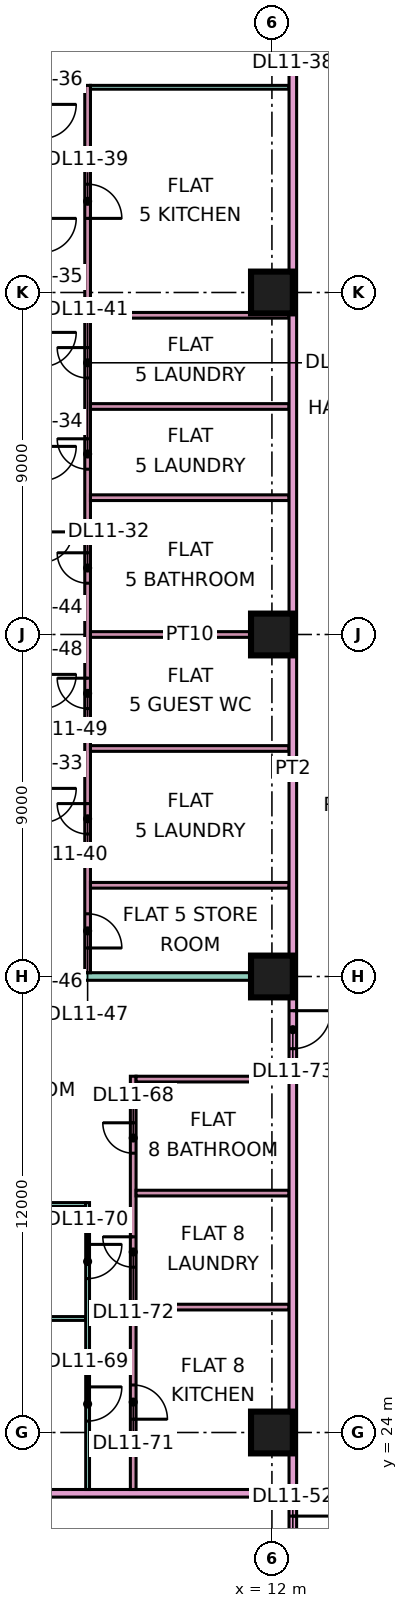
"""IFC4 building model, lengths in metres.
Left out: names, types, materials, properties, quantities, classifications, styles, units other than length and angle.
Written with IfcOpenShell. Run it as: python <this file> out.ifc"""

import sys

from ifc_helpers import new_model, si_unit, direction, frame, frame_2d, origin, origin_2d, place, context, subcontext, project, spatial, rectangle, extrude, element, fill, save


model = new_model("IFC4")
c1 = context("Model", 3, precision=1e-05, world=origin(), true_north=direction((0.0, 1.0)))
c2 = subcontext(c1, "Body", "Model", "MODEL_VIEW")
j1 = project(units=[si_unit("LENGTHUNIT", "METRE"), si_unit("PLANEANGLEUNIT", "RADIAN")], contexts=[c1])
p1 = place(None, origin())
s1 = spatial("IfcSite", under=j1, at=p1, CompositionType="ELEMENT")
p2 = place(p1, origin())
s2 = spatial("IfcBuilding", under=s1, at=p2, CompositionType="ELEMENT")
p3 = place(p2, frame((0.0, 0.0, 56.4)))
s3 = spatial("IfcBuildingStorey", under=s2, at=p3, CompositionType="ELEMENT", Elevation=56.4)
for number, where, z_axis, x_axis in (
    (1, (12.0, 24.0, 0.0), (0.0, 0.0, 1.0), (1.0, 0.0, 0.0)),
    (2, (12.0, 36.0, 0.0), (0.0, 0.0, 1.0), (1.0, 0.0, 0.0)),
    (3, (12.0, 45.0, 0.0), (0.0, 0.0, 1.0), (1.0, 0.0, 0.0)),
    (4, (12.0, 54.0, 0.0), (0.0, 0.0, 1.0), (1.0, 0.0, 0.0)),
):
    element("IfcColumn", number, at=place(p3, frame(where, z_axis=z_axis, x_axis=x_axis)), inside=s3, PredefinedType="COLUMN", context=c2, shape_type="SweptSolid", body=[
        extrude(rectangle(XDim=1.1, YDim=1.1, at=origin_2d()), origin(), (0.0, 0.0, 1.0), 3.75),
    ])
p4 = place(p3, frame((-1.351, 27.0, 0.0), z_axis=(0.0, 0.0, 1.0), x_axis=(1.0, 0.0, 0.0)))
e5 = element("IfcWall", 5, at=p4, inside=s3, PredefinedType="PARTITIONING", context=c2, shape_type="SweptSolid", body=[
    extrude(rectangle(XDim=8.451, YDim=0.1, at=frame_2d((4.226, 0.0))), origin(), (0.0, 0.0, 1.0), 3.35),
])
p5 = place(p3, frame((-1.35, 30.0, 0.0), z_axis=(0.0, 0.0, 1.0), x_axis=(1.0, 0.0, 0.0)))
e6 = element("IfcWall", 6, at=p5, inside=s3, PredefinedType="PARTITIONING", context=c2, shape_type="SweptSolid", body=[
    extrude(rectangle(XDim=8.45, YDim=0.1, at=frame_2d((4.225, 0.0))), origin(), (0.0, 0.0, 1.0), 3.35),
])
p6 = place(p3, frame((0.0, 36.0, 0.0), z_axis=(0.0, 0.0, 1.0), x_axis=(1.0, 0.0, 0.0)))
e7 = element("IfcWall", 7, at=p6, inside=s3, PredefinedType="PARTITIONING", context=c2, shape_type="SweptSolid", body=[
    extrude(rectangle(XDim=12.45, YDim=0.2, at=frame_2d((6.225, 0.0))), origin(), (0.0, 0.0, 1.0), 3.35),
])
p7 = place(p3, frame((0.074, 22.4, 0.0), z_axis=(0.0, 0.0, 1.0), x_axis=(1.0, 0.0, 0.0)))
e8 = element("IfcWall", 8, at=p7, inside=s3, PredefinedType="PARTITIONING", context=c2, shape_type="SweptSolid", body=[
    extrude(rectangle(XDim=12.376, YDim=0.2, at=frame_2d((6.188, 0.0))), origin(), (0.0, 0.0, 1.0), 3.35),
])
p8 = place(p3, frame((7.15, 22.5, 0.0), z_axis=(0.0, 0.0, 1.0), x_axis=(0.0, 1.0, 0.0)))
e9 = element("IfcWall", 9, at=p8, inside=s3, PredefinedType="PARTITIONING", context=c2, shape_type="SweptSolid", body=[
    extrude(rectangle(XDim=7.55, YDim=0.1, at=frame_2d((3.775, 0.0))), origin(), (0.0, 0.0, 1.0), 3.35),
])
p9 = place(p8, frame((1.8, 0.0, 0.0)))
e10 = element("IfcOpeningElement", 10, at=p9, cuts=e9, PredefinedType="OPENING", context=c2, shape_type="SweptSolid", body=[
    extrude(rectangle(XDim=0.9, YDim=2.1, at=frame_2d((0.45, 1.05))), frame((0.0, 0.06, 0.0), z_axis=(0.0, -1.0, 0.0), x_axis=(1.0, 0.0, 0.0)), (0.0, 0.0, 1.0), 0.12),
])
p10 = place(p8, frame((5.55, 0.0, 0.0)))
e11 = element("IfcOpeningElement", 11, at=p10, cuts=e9, PredefinedType="OPENING", context=c2, shape_type="SweptSolid", body=[
    extrude(rectangle(XDim=0.9, YDim=2.1, at=frame_2d((0.45, 1.05))), frame((0.0, 0.06, 0.0), z_axis=(0.0, -1.0, 0.0), x_axis=(1.0, 0.0, 0.0)), (0.0, 0.0, 1.0), 0.12),
])
p11 = place(p3, frame((7.15, 36.1, 0.0), z_axis=(0.0, 0.0, 1.0), x_axis=(0.0, 1.0, 0.0)))
e12 = element("IfcWall", 12, at=p11, inside=s3, PredefinedType="PARTITIONING", context=c2, shape_type="SweptSolid", body=[
    extrude(rectangle(XDim=23.35, YDim=0.15, at=frame_2d((11.675, 0.0))), origin(), (0.0, 0.0, 1.0), 3.35),
])
p12 = place(p11, frame((10.25, 0.0, 0.0)))
e13 = element("IfcOpeningElement", 13, at=p12, cuts=e12, PredefinedType="OPENING", context=c2, shape_type="SweptSolid", body=[
    extrude(rectangle(XDim=0.8, YDim=2.1, at=frame_2d((0.4, 1.05))), frame((0.0, 0.085, 0.0), z_axis=(0.0, -1.0, 0.0), x_axis=(1.0, 0.0, 0.0)), (0.0, 0.0, 1.0), 0.17),
])
p13 = place(p11, frame((19.85, 0.0, 0.0)))
e14 = element("IfcOpeningElement", 14, at=p13, cuts=e12, PredefinedType="OPENING", context=c2, shape_type="SweptSolid", body=[
    extrude(rectangle(XDim=0.9, YDim=2.1, at=frame_2d((0.45, 1.05))), frame((0.0, 0.085, 0.0), z_axis=(0.0, -1.0, 0.0), x_axis=(1.0, 0.0, 0.0)), (0.0, 0.0, 1.0), 0.17),
])
p14 = place(p11, frame((3.65, 0.0, 0.0)))
e15 = element("IfcOpeningElement", 15, at=p14, cuts=e12, PredefinedType="OPENING", context=c2, shape_type="SweptSolid", body=[
    extrude(rectangle(XDim=0.8, YDim=2.1, at=frame_2d((0.4, 1.05))), frame((0.0, 0.085, 0.0), z_axis=(0.0, -1.0, 0.0), x_axis=(1.0, 0.0, 0.0)), (0.0, 0.0, 1.0), 0.17),
])
p15 = place(p11, frame((13.25, 0.0, 0.0)))
e16 = element("IfcOpeningElement", 16, at=p15, cuts=e12, PredefinedType="OPENING", context=c2, shape_type="SweptSolid", body=[
    extrude(rectangle(XDim=0.8, YDim=2.1, at=frame_2d((0.4, 1.05))), frame((0.0, 0.085, 0.0), z_axis=(0.0, -1.0, 0.0), x_axis=(1.0, 0.0, 0.0)), (0.0, 0.0, 1.0), 0.17),
])
p16 = place(p11, frame((15.65, 0.0, 0.0)))
e17 = element("IfcOpeningElement", 17, at=p16, cuts=e12, PredefinedType="OPENING", context=c2, shape_type="SweptSolid", body=[
    extrude(rectangle(XDim=0.8, YDim=2.1, at=frame_2d((0.4, 1.05))), frame((0.0, 0.085, 0.0), z_axis=(0.0, -1.0, 0.0), x_axis=(1.0, 0.0, 0.0)), (0.0, 0.0, 1.0), 0.17),
])
p17 = place(p11, frame((0.65, 0.0, 0.0)))
e18 = element("IfcOpeningElement", 18, at=p17, cuts=e12, PredefinedType="OPENING", context=c2, shape_type="SweptSolid", body=[
    extrude(rectangle(XDim=0.9, YDim=2.1, at=frame_2d((0.45, 1.05))), frame((0.0, 0.085, 0.0), z_axis=(0.0, -1.0, 0.0), x_axis=(1.0, 0.0, 0.0)), (0.0, 0.0, 1.0), 0.17),
])
p18 = place(p11, frame((6.95, 0.0, 0.0)))
e19 = element("IfcOpeningElement", 19, at=p18, cuts=e12, PredefinedType="OPENING", context=c2, shape_type="SweptSolid", body=[
    extrude(rectangle(XDim=0.8, YDim=2.1, at=frame_2d((0.4, 1.05))), frame((0.0, 0.085, 0.0), z_axis=(0.0, -1.0, 0.0), x_axis=(1.0, 0.0, 0.0)), (0.0, 0.0, 1.0), 0.17),
])
for number, where, z_axis, x_axis in (
    (20, (7.225, 38.4, 0.0), (0.0, 0.0, 1.0), (1.0, 0.0, 0.0)),
    (21, (7.225, 42.0, 0.0), (0.0, 0.0, 1.0), (1.0, 0.0, 0.0)),
    (22, (7.225, 45.0, 0.0), (0.0, 0.0, 1.0), (1.0, 0.0, 0.0)),
    (23, (7.225, 48.6, 0.0), (0.0, 0.0, 1.0), (1.0, 0.0, 0.0)),
    (24, (7.225, 51.0, 0.0), (0.0, 0.0, 1.0), (1.0, 0.0, 0.0)),
    (25, (7.225, 53.4, 0.0), (0.0, 0.0, 1.0), (1.0, 0.0, 0.0)),
):
    element("IfcWall", number, at=place(p3, frame(where, z_axis=z_axis, x_axis=x_axis)), inside=s3, PredefinedType="PARTITIONING", context=c2, shape_type="SweptSolid", body=[
        extrude(rectangle(XDim=5.225, YDim=0.15, at=frame_2d((2.612, 0.0))), origin(), (0.0, 0.0, 1.0), 3.35),
    ])
p19 = place(p3, frame((7.225, 59.4, 0.0), z_axis=(0.0, 0.0, 1.0), x_axis=(1.0, 0.0, 0.0)))
e26 = element("IfcWall", 26, at=p19, inside=s3, PredefinedType="PARTITIONING", context=c2, shape_type="SweptSolid", body=[
    extrude(rectangle(XDim=5.225, YDim=0.1, at=frame_2d((2.612, 0.0))), origin(), (0.0, 0.0, 1.0), 3.35),
])
p20 = place(p3, frame((8.35, 22.5, 0.0), z_axis=(0.0, 0.0, 1.0), x_axis=(0.0, 1.0, 0.0)))
e27 = element("IfcWall", 27, at=p20, inside=s3, PredefinedType="PARTITIONING", context=c2, shape_type="SweptSolid", body=[
    extrude(rectangle(XDim=10.875, YDim=0.15, at=frame_2d((5.438, 0.0))), origin(), (0.0, 0.0, 1.0), 3.35),
])
p21 = place(p20, frame((8.85, 0.0, 0.0)))
e28 = element("IfcOpeningElement", 28, at=p21, cuts=e27, PredefinedType="OPENING", context=c2, shape_type="SweptSolid", body=[
    extrude(rectangle(XDim=0.8, YDim=2.1, at=frame_2d((0.4, 1.05))), frame((0.0, 0.085, 0.0), z_axis=(0.0, -1.0, 0.0), x_axis=(1.0, 0.0, 0.0)), (0.0, 0.0, 1.0), 0.17),
])
p22 = place(p20, frame((1.85, 0.0, 0.0)))
e29 = element("IfcOpeningElement", 29, at=p22, cuts=e27, PredefinedType="OPENING", context=c2, shape_type="SweptSolid", body=[
    extrude(rectangle(XDim=0.9, YDim=2.1, at=frame_2d((0.45, 1.05))), frame((0.0, 0.085, 0.0), z_axis=(0.0, -1.0, 0.0), x_axis=(1.0, 0.0, 0.0)), (0.0, 0.0, 1.0), 0.17),
])
p23 = place(p20, frame((5.85, 0.0, 0.0)))
e30 = element("IfcOpeningElement", 30, at=p23, cuts=e27, PredefinedType="OPENING", context=c2, shape_type="SweptSolid", body=[
    extrude(rectangle(XDim=0.8, YDim=2.1, at=frame_2d((0.4, 1.05))), frame((0.0, 0.085, 0.0), z_axis=(0.0, -1.0, 0.0), x_axis=(1.0, 0.0, 0.0)), (0.0, 0.0, 1.0), 0.17),
])
for number, where, z_axis, x_axis in (
    (31, (8.425, 27.3, 0.0), (0.0, 0.0, 1.0), (1.0, 0.0, 0.0)),
    (32, (8.425, 30.3, 0.0), (0.0, 0.0, 1.0), (1.0, 0.0, 0.0)),
    (33, (8.425, 33.3, 0.0), (0.0, 0.0, 1.0), (1.0, 0.0, 0.0)),
):
    element("IfcWall", number, at=place(p3, frame(where, z_axis=z_axis, x_axis=x_axis)), inside=s3, PredefinedType="PARTITIONING", context=c2, shape_type="SweptSolid", body=[
        extrude(rectangle(XDim=4.025, YDim=0.15, at=frame_2d((2.012, 0.0))), origin(), (0.0, 0.0, 1.0), 3.35),
    ])
p24 = place(p3, frame((12.55, 20.0, 0.0), z_axis=(0.0, 0.0, 1.0), x_axis=(0.0, 1.0, 0.0)))
e34 = element("IfcWall", 34, at=p24, inside=s3, PredefinedType="PARTITIONING", context=c2, shape_type="SweptSolid", body=[
    extrude(rectangle(XDim=42.926, YDim=0.2, at=frame_2d((21.463, 0.0))), origin(), (0.0, 0.0, 1.0), 3.35),
])
p25 = place(p24, frame((40.65, 0.0, 0.0)))
e35 = element("IfcOpeningElement", 35, at=p25, cuts=e34, PredefinedType="OPENING", context=c2, shape_type="SweptSolid", body=[
    extrude(rectangle(XDim=1.0, YDim=2.1, at=frame_2d((0.5, 1.05))), frame((0.0, 0.11, 0.0), z_axis=(0.0, -1.0, 0.0), x_axis=(1.0, 0.0, 0.0)), (0.0, 0.0, 1.0), 0.22),
])
p26 = place(p24, frame((0.6, 0.0, 0.0)))
e36 = element("IfcOpeningElement", 36, at=p26, cuts=e34, PredefinedType="OPENING", context=c2, shape_type="SweptSolid", body=[
    extrude(rectangle(XDim=1.2, YDim=2.1, at=frame_2d((0.6, 1.05))), frame((0.0, 0.11, 0.0), z_axis=(0.0, -1.0, 0.0), x_axis=(1.0, 0.0, 0.0)), (0.0, 0.0, 1.0), 0.22),
])
p27 = place(p24, frame((14.1, 0.0, 0.0)))
e37 = element("IfcOpeningElement", 37, at=p27, cuts=e34, PredefinedType="OPENING", context=c2, shape_type="SweptSolid", body=[
    extrude(rectangle(XDim=1.0, YDim=2.1, at=frame_2d((0.5, 1.05))), frame((0.0, 0.11, 0.0), z_axis=(0.0, -1.0, 0.0), x_axis=(1.0, 0.0, 0.0)), (0.0, 0.0, 1.0), 0.22),
])
p28 = place(p12, frame((0.8, 0.0, 0.0), z_axis=(0.0, 0.0, 1.0), x_axis=(-1.0, 0.0, 0.0)))
e38 = element("IfcDoor", 38, at=p28, inside=s3, OperationType="SINGLE_SWING_RIGHT", PredefinedType="DOOR", context=c2, shape_type="SweptSolid", body=[
    extrude(rectangle(XDim=0.8, YDim=2.1, at=frame_2d((0.4, 1.05))), frame((0.0, 0.025, 0.0), z_axis=(0.0, -1.0, 0.0), x_axis=(1.0, 0.0, 0.0)), (0.0, 0.0, 1.0), 0.05),
])
fill(e13, e38)
p29 = place(p13, frame((0.9, 0.0, 0.0), z_axis=(0.0, 0.0, 1.0), x_axis=(-1.0, 0.0, 0.0)))
e39 = element("IfcDoor", 39, at=p29, inside=s3, OperationType="SINGLE_SWING_LEFT", PredefinedType="DOOR", context=c2, shape_type="SweptSolid", body=[
    extrude(rectangle(XDim=0.9, YDim=2.1, at=frame_2d((0.45, 1.05))), frame((0.0, 0.025, 0.0), z_axis=(0.0, -1.0, 0.0), x_axis=(1.0, 0.0, 0.0)), (0.0, 0.0, 1.0), 0.05),
])
fill(e14, e39)
p30 = place(p14, frame((0.8, 0.0, 0.0), z_axis=(0.0, 0.0, 1.0), x_axis=(-1.0, 0.0, 0.0)))
e40 = element("IfcDoor", 40, at=p30, inside=s3, OperationType="SINGLE_SWING_RIGHT", PredefinedType="DOOR", context=c2, shape_type="SweptSolid", body=[
    extrude(rectangle(XDim=0.8, YDim=2.1, at=frame_2d((0.4, 1.05))), frame((0.0, 0.025, 0.0), z_axis=(0.0, -1.0, 0.0), x_axis=(1.0, 0.0, 0.0)), (0.0, 0.0, 1.0), 0.05),
])
fill(e15, e40)
p31 = place(p15, frame((0.8, 0.0, 0.0), z_axis=(0.0, 0.0, 1.0), x_axis=(-1.0, 0.0, 0.0)))
e41 = element("IfcDoor", 41, at=p31, inside=s3, OperationType="SINGLE_SWING_RIGHT", PredefinedType="DOOR", context=c2, shape_type="SweptSolid", body=[
    extrude(rectangle(XDim=0.8, YDim=2.1, at=frame_2d((0.4, 1.05))), frame((0.0, 0.025, 0.0), z_axis=(0.0, -1.0, 0.0), x_axis=(1.0, 0.0, 0.0)), (0.0, 0.0, 1.0), 0.05),
])
fill(e16, e41)
p32 = place(p16, frame((0.8, 0.0, 0.0), z_axis=(0.0, 0.0, 1.0), x_axis=(-1.0, 0.0, 0.0)))
e42 = element("IfcDoor", 42, at=p32, inside=s3, OperationType="SINGLE_SWING_RIGHT", PredefinedType="DOOR", context=c2, shape_type="SweptSolid", body=[
    extrude(rectangle(XDim=0.8, YDim=2.1, at=frame_2d((0.4, 1.05))), frame((0.0, 0.025, 0.0), z_axis=(0.0, -1.0, 0.0), x_axis=(1.0, 0.0, 0.0)), (0.0, 0.0, 1.0), 0.05),
])
fill(e17, e42)
p33 = place(p17, frame((0.9, 0.0, 0.0), z_axis=(0.0, 0.0, 1.0), x_axis=(-1.0, 0.0, 0.0)))
e43 = element("IfcDoor", 43, at=p33, inside=s3, OperationType="SINGLE_SWING_LEFT", PredefinedType="DOOR", context=c2, shape_type="SweptSolid", body=[
    extrude(rectangle(XDim=0.9, YDim=2.1, at=frame_2d((0.45, 1.05))), frame((0.0, 0.025, 0.0), z_axis=(0.0, -1.0, 0.0), x_axis=(1.0, 0.0, 0.0)), (0.0, 0.0, 1.0), 0.05),
])
fill(e18, e43)
p34 = place(p18, frame((0.8, 0.0, 0.0), z_axis=(0.0, 0.0, 1.0), x_axis=(-1.0, 0.0, 0.0)))
e44 = element("IfcDoor", 44, at=p34, inside=s3, OperationType="SINGLE_SWING_RIGHT", PredefinedType="DOOR", context=c2, shape_type="SweptSolid", body=[
    extrude(rectangle(XDim=0.8, YDim=2.1, at=frame_2d((0.4, 1.05))), frame((0.0, 0.025, 0.0), z_axis=(0.0, -1.0, 0.0), x_axis=(1.0, 0.0, 0.0)), (0.0, 0.0, 1.0), 0.05),
])
fill(e19, e44)
p35 = place(p26, origin())
e45 = element("IfcDoor", 45, at=p35, inside=s3, OperationType="SINGLE_SWING_RIGHT", PredefinedType="DOOR", context=c2, shape_type="SweptSolid", body=[
    extrude(rectangle(XDim=1.2, YDim=2.1, at=frame_2d((0.6, 1.05))), frame((0.0, 0.025, 0.0), z_axis=(0.0, -1.0, 0.0), x_axis=(1.0, 0.0, 0.0)), (0.0, 0.0, 1.0), 0.05),
])
fill(e36, e45)
p36 = place(p21, frame((0.8, 0.0, 0.0), z_axis=(0.0, 0.0, 1.0), x_axis=(-1.0, 0.0, 0.0)))
e46 = element("IfcDoor", 46, at=p36, inside=s3, OperationType="SINGLE_SWING_RIGHT", PredefinedType="DOOR", context=c2, shape_type="SweptSolid", body=[
    extrude(rectangle(XDim=0.8, YDim=2.1, at=frame_2d((0.4, 1.05))), frame((0.0, 0.025, 0.0), z_axis=(0.0, -1.0, 0.0), x_axis=(1.0, 0.0, 0.0)), (0.0, 0.0, 1.0), 0.05),
])
fill(e28, e46)
p37 = place(p9, origin())
e47 = element("IfcDoor", 47, at=p37, inside=s3, OperationType="SINGLE_SWING_RIGHT", PredefinedType="DOOR", context=c2, shape_type="SweptSolid", body=[
    extrude(rectangle(XDim=0.9, YDim=2.1, at=frame_2d((0.45, 1.05))), frame((0.0, 0.025, 0.0), z_axis=(0.0, -1.0, 0.0), x_axis=(1.0, 0.0, 0.0)), (0.0, 0.0, 1.0), 0.05),
])
fill(e10, e47)
p38 = place(p10, origin())
e48 = element("IfcDoor", 48, at=p38, inside=s3, OperationType="SINGLE_SWING_RIGHT", PredefinedType="DOOR", context=c2, shape_type="SweptSolid", body=[
    extrude(rectangle(XDim=0.9, YDim=2.1, at=frame_2d((0.45, 1.05))), frame((0.0, 0.025, 0.0), z_axis=(0.0, -1.0, 0.0), x_axis=(1.0, 0.0, 0.0)), (0.0, 0.0, 1.0), 0.05),
])
fill(e11, e48)
p39 = place(p22, frame((0.9, 0.0, 0.0), z_axis=(0.0, 0.0, 1.0), x_axis=(-1.0, 0.0, 0.0)))
e49 = element("IfcDoor", 49, at=p39, inside=s3, OperationType="SINGLE_SWING_LEFT", PredefinedType="DOOR", context=c2, shape_type="SweptSolid", body=[
    extrude(rectangle(XDim=0.9, YDim=2.1, at=frame_2d((0.45, 1.05))), frame((0.0, 0.025, 0.0), z_axis=(0.0, -1.0, 0.0), x_axis=(1.0, 0.0, 0.0)), (0.0, 0.0, 1.0), 0.05),
])
fill(e29, e49)
p40 = place(p23, frame((0.8, 0.0, 0.0), z_axis=(0.0, 0.0, 1.0), x_axis=(-1.0, 0.0, 0.0)))
e50 = element("IfcDoor", 50, at=p40, inside=s3, OperationType="SINGLE_SWING_RIGHT", PredefinedType="DOOR", context=c2, shape_type="SweptSolid", body=[
    extrude(rectangle(XDim=0.8, YDim=2.1, at=frame_2d((0.4, 1.05))), frame((0.0, 0.025, 0.0), z_axis=(0.0, -1.0, 0.0), x_axis=(1.0, 0.0, 0.0)), (0.0, 0.0, 1.0), 0.05),
])
fill(e30, e50)
p41 = place(p27, origin())
e51 = element("IfcDoor", 51, at=p41, inside=s3, OperationType="SINGLE_SWING_RIGHT", PredefinedType="DOOR", context=c2, shape_type="SweptSolid", body=[
    extrude(rectangle(XDim=1.0, YDim=2.1, at=frame_2d((0.5, 1.05))), frame((0.0, 0.025, 0.0), z_axis=(0.0, -1.0, 0.0), x_axis=(1.0, 0.0, 0.0)), (0.0, 0.0, 1.0), 0.05),
])
fill(e37, e51)
save(model, sys.argv[1])
